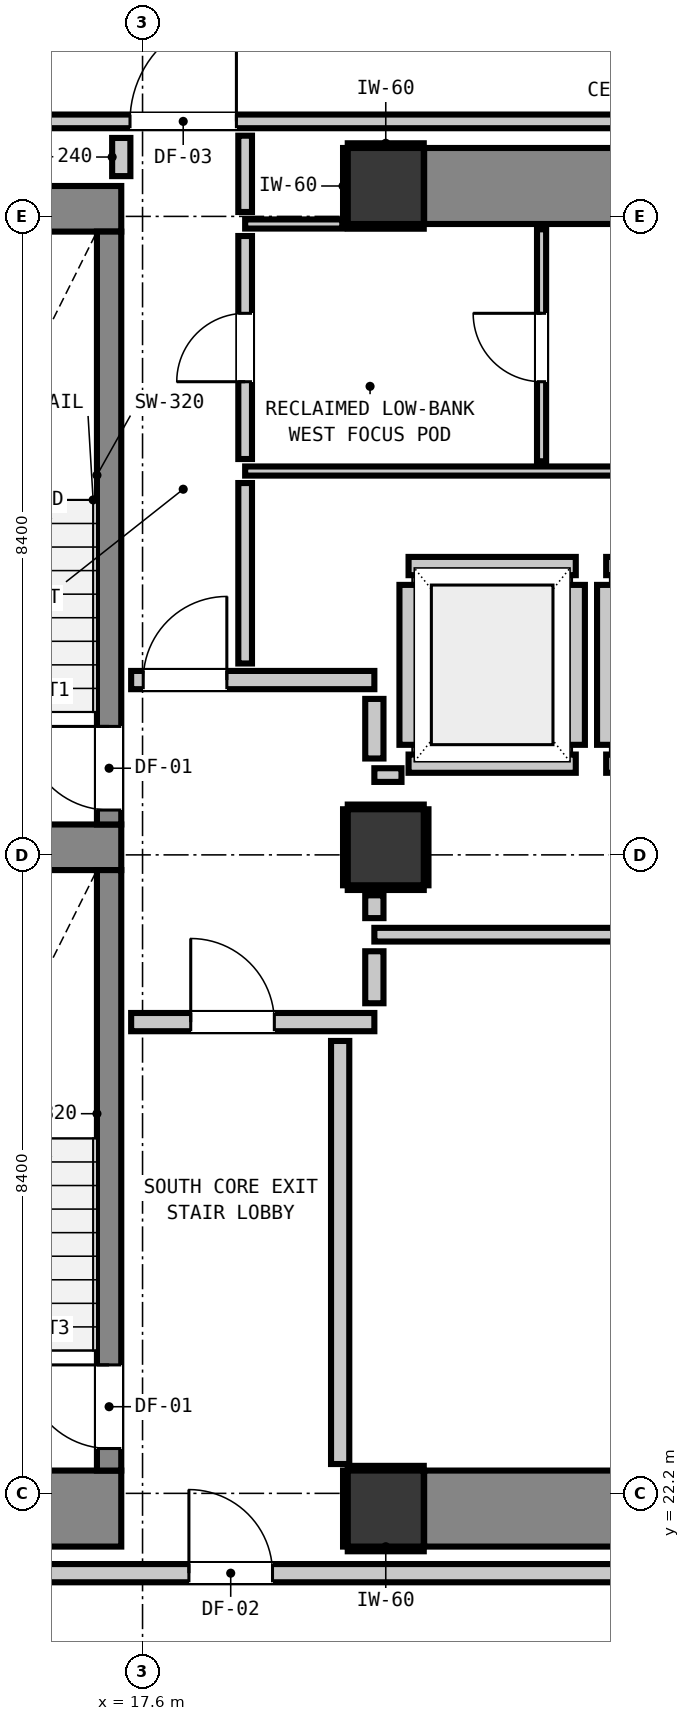
"""IFC4 building model, lengths in metres.
Left out: names, types, materials, properties, quantities, classifications, styles, units other than length and angle.
Written with IfcOpenShell. Run it as: python <this file> out.ifc"""

import sys

from ifc_helpers import new_model, si_unit, direction, frame, frame_2d, origin, origin_2d, place, context, subcontext, project, spatial, rectangle, extrude, element, fill, save


model = new_model("IFC4")
c1 = context("Model", 3, precision=1e-05, world=origin(), true_north=direction((0.0, 1.0)))
c2 = subcontext(c1, "Body", "Model", "MODEL_VIEW")
j1 = project(units=[si_unit("LENGTHUNIT", "METRE"), si_unit("PLANEANGLEUNIT", "RADIAN")], contexts=[c1])
p1 = place(None, origin())
s1 = spatial("IfcSite", under=j1, at=p1, CompositionType="ELEMENT")
p2 = place(p1, origin())
s2 = spatial("IfcBuilding", under=s1, at=p2, CompositionType="ELEMENT")
p3 = place(p2, frame((0.0, 0.0, 139.28)))
s3 = spatial("IfcBuildingStorey", under=s2, at=p3, CompositionType="ELEMENT", Elevation=139.28)
for number, where, z_axis, x_axis in (
    (1, (20.8, 22.0, 0.0), (0.0, 0.0, 1.0), (1.0, 0.0, 0.0)),
    (2, (20.8, 39.4, 0.0), (0.0, 0.0, 1.0), (1.0, 0.0, 0.0)),
):
    element("IfcColumn", number, at=place(p3, frame(where, z_axis=z_axis, x_axis=x_axis)), inside=s3, PredefinedType="COLUMN", context=c2, shape_type="SweptSolid", body=[
        extrude(rectangle(XDim=1.0, YDim=1.0, at=origin_2d()), origin(), (0.0, 0.0, 1.0), 3.32),
    ])
p4 = place(p3, frame((13.24, 22.0, 0.0), z_axis=(0.0, 0.0, 1.0), x_axis=(1.0, 0.0, 0.0)))
e3 = element("IfcWall", 3, at=p4, inside=s3, PredefinedType="SHEAR", context=c2, shape_type="SweptSolid", body=[
    extrude(rectangle(XDim=4.08, YDim=1.0, at=frame_2d((2.04, 0.0))), origin(), (0.0, 0.0, 1.0), 3.32),
])
p5 = place(p3, frame((13.24, 39.1, 0.0), z_axis=(0.0, 0.0, 1.0), x_axis=(1.0, 0.0, 0.0)))
e4 = element("IfcWall", 4, at=p5, inside=s3, PredefinedType="SHEAR", context=c2, shape_type="SweptSolid", body=[
    extrude(rectangle(XDim=4.08, YDim=0.6, at=frame_2d((2.04, 0.0))), origin(), (0.0, 0.0, 1.0), 3.32),
])
p6 = place(p3, frame((13.905, 30.7, 0.0), z_axis=(0.0, 0.0, 1.0), x_axis=(1.0, 0.0, 0.0)))
e5 = element("IfcWall", 5, at=p6, inside=s3, PredefinedType="SHEAR", context=c2, shape_type="SweptSolid", body=[
    extrude(rectangle(XDim=3.415, YDim=0.6, at=frame_2d((1.708, 0.0))), origin(), (0.0, 0.0, 1.0), 3.32),
])
for number, where, z_axis, x_axis in (
    (6, (21.305, 22.0, 0.0), (0.0, 0.0, 1.0), (1.0, 0.0, 0.0)),
    (7, (21.305, 39.4, 0.0), (0.0, 0.0, 1.0), (1.0, 0.0, 0.0)),
):
    element("IfcWall", number, at=place(p3, frame(where, z_axis=z_axis, x_axis=x_axis)), inside=s3, PredefinedType="SHEAR", context=c2, shape_type="SweptSolid", body=[
        extrude(rectangle(XDim=7.39, YDim=1.0, at=frame_2d((3.695, 0.0))), origin(), (0.0, 0.0, 1.0), 3.32),
    ])
p7 = place(p3, frame((17.16, 31.0, 0.0), z_axis=(0.0, 0.0, 1.0), x_axis=(0.0, 1.0, 0.0)))
e8 = element("IfcWall", 8, at=p7, inside=s3, PredefinedType="SHEAR", context=c2, shape_type="SweptSolid", body=[
    extrude(rectangle(XDim=7.8, YDim=0.32, at=frame_2d((3.9, 0.0))), origin(), (0.0, 0.0, 1.0), 3.32),
])
p8 = place(p7, frame((0.19, 0.0, 0.0)))
e9 = element("IfcOpeningElement", 9, at=p8, cuts=e8, PredefinedType="OPENING", context=c2, shape_type="SweptSolid", body=[
    extrude(rectangle(XDim=1.1, YDim=2.15, at=frame_2d((0.55, 1.075))), frame((0.0, 0.17, 0.0), z_axis=(0.0, -1.0, 0.0), x_axis=(1.0, 0.0, 0.0)), (0.0, 0.0, 1.0), 0.34),
])
p9 = place(p3, frame((17.16, 22.5, 0.0), z_axis=(0.0, 0.0, 1.0), x_axis=(0.0, 1.0, 0.0)))
e10 = element("IfcWall", 10, at=p9, inside=s3, PredefinedType="SHEAR", context=c2, shape_type="SweptSolid", body=[
    extrude(rectangle(XDim=7.9, YDim=0.32, at=frame_2d((3.95, 0.0))), origin(), (0.0, 0.0, 1.0), 3.32),
])
p10 = place(p9, frame((0.29, 0.0, 0.0)))
e11 = element("IfcOpeningElement", 11, at=p10, cuts=e10, PredefinedType="OPENING", context=c2, shape_type="SweptSolid", body=[
    extrude(rectangle(XDim=1.1, YDim=2.15, at=frame_2d((0.55, 1.075))), frame((0.0, 0.17, 0.0), z_axis=(0.0, -1.0, 0.0), x_axis=(1.0, 0.0, 0.0)), (0.0, 0.0, 1.0), 0.34),
])
p11 = place(p3, frame((20.8, 30.7, 0.0), z_axis=(0.0, 0.0, 1.0), x_axis=(1.0, 0.0, 0.0)))
e12 = element("IfcColumn", 12, at=p11, inside=s3, PredefinedType="COLUMN", context=c2, shape_type="SweptSolid", body=[
    extrude(rectangle(XDim=1.0, YDim=1.0, at=origin_2d()), origin(), (0.0, 0.0, 1.0), 3.32),
])
for number, where, z_axis, x_axis in (
    (13, (21.1, 31.8, 0.0), (0.0, 0.0, 1.0), (1.0, 0.0, 0.0)),
    (14, (21.1, 34.4, 0.0), (0.0, 0.0, 1.0), (1.0, 0.0, 0.0)),
):
    element("IfcWall", number, at=place(p3, frame(where, z_axis=z_axis, x_axis=x_axis)), inside=s3, PredefinedType="PARTITIONING", context=c2, shape_type="SweptSolid", body=[
        extrude(rectangle(XDim=2.2, YDim=0.24, at=frame_2d((1.1, 0.0))), origin(), (0.0, 0.0, 1.0), 3.08),
    ])
p12 = place(p3, frame((21.1, 32.048, 0.0), z_axis=(0.0, 0.0, 1.0), x_axis=(0.0, 1.0, 0.0)))
e15 = element("IfcWall", 15, at=p12, inside=s3, PredefinedType="PARTITIONING", context=c2, shape_type="SweptSolid", body=[
    extrude(rectangle(XDim=2.104, YDim=0.24, at=frame_2d((1.052, 0.0))), origin(), (0.0, 0.0, 1.0), 2.315),
])
p13 = place(p3, frame((23.3, 32.048, 0.0), z_axis=(0.0, 0.0, 1.0), x_axis=(0.0, 1.0, 0.0)))
e16 = element("IfcWall", 16, at=p13, inside=s3, PredefinedType="PARTITIONING", context=c2, shape_type="SweptSolid", body=[
    extrude(rectangle(XDim=2.104, YDim=0.24, at=frame_2d((1.052, 0.0))), origin(), (0.0, 0.0, 1.0), 3.08),
])
for number, where, z_axis, x_axis in (
    (17, (23.7, 31.8, 0.0), (0.0, 0.0, 1.0), (1.0, 0.0, 0.0)),
    (18, (23.7, 34.4, 0.0), (0.0, 0.0, 1.0), (1.0, 0.0, 0.0)),
):
    element("IfcWall", number, at=place(p3, frame(where, z_axis=z_axis, x_axis=x_axis)), inside=s3, PredefinedType="PARTITIONING", context=c2, shape_type="SweptSolid", body=[
        extrude(rectangle(XDim=2.2, YDim=0.24, at=frame_2d((1.1, 0.0))), origin(), (0.0, 0.0, 1.0), 3.08),
    ])
p14 = place(p3, frame((23.7, 32.048, 0.0), z_axis=(0.0, 0.0, 1.0), x_axis=(0.0, 1.0, 0.0)))
e19 = element("IfcWall", 19, at=p14, inside=s3, PredefinedType="PARTITIONING", context=c2, shape_type="SweptSolid", body=[
    extrude(rectangle(XDim=2.104, YDim=0.24, at=frame_2d((1.052, 0.0))), origin(), (0.0, 0.0, 1.0), 3.08),
])
p15 = place(p3, frame((9.407, 21.15, 0.0), z_axis=(0.0, 0.0, 1.0), x_axis=(1.0, 0.0, 0.0)))
e20 = element("IfcWall", 20, at=p15, inside=s3, PredefinedType="PARTITIONING", context=c2, shape_type="SweptSolid", body=[
    extrude(rectangle(XDim=39.386, YDim=0.24, at=frame_2d((19.693, 0.0))), origin(), (0.0, 0.0, 1.0), 3.08),
])
p16 = place(p15, frame((8.803, 0.0, 0.0)))
e21 = element("IfcOpeningElement", 21, at=p16, cuts=e20, PredefinedType="OPENING", context=c2, shape_type="SweptSolid", body=[
    extrude(rectangle(XDim=1.1, YDim=2.15, at=frame_2d((0.55, 1.075))), frame((0.0, 0.13, 0.0), z_axis=(0.0, -1.0, 0.0), x_axis=(1.0, 0.0, 0.0)), (0.0, 0.0, 1.0), 0.26),
])
p17 = place(p15, frame((1.192, 0.0, 0.0)))
e22 = element("IfcOpeningElement", 22, at=p17, cuts=e20, PredefinedType="OPENING", context=c2, shape_type="SweptSolid", body=[
    extrude(rectangle(XDim=1.4, YDim=2.15, at=frame_2d((0.7, 1.075))), frame((0.0, 0.13, 0.0), z_axis=(0.0, -1.0, 0.0), x_axis=(1.0, 0.0, 0.0)), (0.0, 0.0, 1.0), 0.26),
])
p18 = place(p15, frame((28.643, 0.0, 0.0)))
e23 = element("IfcOpeningElement", 23, at=p18, cuts=e20, PredefinedType="OPENING", context=c2, shape_type="SweptSolid", body=[
    extrude(rectangle(XDim=1.4, YDim=2.15, at=frame_2d((0.7, 1.075))), frame((0.0, 0.13, 0.0), z_axis=(0.0, -1.0, 0.0), x_axis=(1.0, 0.0, 0.0)), (0.0, 0.0, 1.0), 0.26),
])
p19 = place(p3, frame((17.45, 28.4, 0.0), z_axis=(0.0, 0.0, 1.0), x_axis=(1.0, 0.0, 0.0)))
e24 = element("IfcWall", 24, at=p19, inside=s3, PredefinedType="PARTITIONING", context=c2, shape_type="SweptSolid", body=[
    extrude(rectangle(XDim=3.2, YDim=0.24, at=frame_2d((1.6, 0.0))), origin(), (0.0, 0.0, 1.0), 3.08),
])
p20 = place(p19, frame((0.784, 0.0, 0.0)))
e25 = element("IfcOpeningElement", 25, at=p20, cuts=e24, PredefinedType="OPENING", context=c2, shape_type="SweptSolid", body=[
    extrude(rectangle(XDim=1.1, YDim=2.15, at=frame_2d((0.55, 1.075))), frame((0.0, 0.13, 0.0), z_axis=(0.0, -1.0, 0.0), x_axis=(1.0, 0.0, 0.0)), (0.0, 0.0, 1.0), 0.26),
])
p21 = place(p3, frame((17.45, 32.9, 0.0), z_axis=(0.0, 0.0, 1.0), x_axis=(1.0, 0.0, 0.0)))
e26 = element("IfcWall", 26, at=p21, inside=s3, PredefinedType="PARTITIONING", context=c2, shape_type="SweptSolid", body=[
    extrude(rectangle(XDim=3.2, YDim=0.24, at=frame_2d((1.6, 0.0))), origin(), (0.0, 0.0, 1.0), 3.08),
])
p22 = place(p21, frame((0.159, 0.0, 0.0)))
e27 = element("IfcOpeningElement", 27, at=p22, cuts=e26, PredefinedType="OPENING", context=c2, shape_type="SweptSolid", body=[
    extrude(rectangle(XDim=1.1, YDim=2.15, at=frame_2d((0.55, 1.075))), frame((0.0, 0.13, 0.0), z_axis=(0.0, -1.0, 0.0), x_axis=(1.0, 0.0, 0.0)), (0.0, 0.0, 1.0), 0.26),
])
p23 = place(p3, frame((20.65, 29.55, 0.0), z_axis=(0.0, 0.0, 1.0), x_axis=(1.0, 0.0, 0.0)))
e28 = element("IfcWall", 28, at=p23, inside=s3, PredefinedType="PARTITIONING", context=c2, shape_type="SweptSolid", body=[
    extrude(rectangle(XDim=9.325, YDim=0.18, at=frame_2d((4.663, 0.0))), origin(), (0.0, 0.0, 1.0), 3.08),
])
p24 = place(p3, frame((20.65, 31.65, 0.0), z_axis=(0.0, 0.0, 1.0), x_axis=(1.0, 0.0, 0.0)))
e29 = element("IfcWall", 29, at=p24, inside=s3, PredefinedType="PARTITIONING", context=c2, shape_type="SweptSolid", body=[
    extrude(rectangle(XDim=0.357, YDim=0.18, at=frame_2d((0.179, 0.0))), origin(), (0.0, 0.0, 1.0), 3.08),
])
p25 = place(p3, frame((9.407, 40.25, 0.0), z_axis=(0.0, 0.0, 1.0), x_axis=(1.0, 0.0, 0.0)))
e30 = element("IfcWall", 30, at=p25, inside=s3, PredefinedType="PARTITIONING", context=c2, shape_type="SweptSolid", body=[
    extrude(rectangle(XDim=27.536, YDim=0.18, at=frame_2d((13.768, 0.0))), origin(), (0.0, 0.0, 1.0), 3.08),
])
p26 = place(p25, frame((8.028, 0.0, 0.0)))
e31 = element("IfcOpeningElement", 31, at=p26, cuts=e30, PredefinedType="OPENING", context=c2, shape_type="SweptSolid", body=[
    extrude(rectangle(XDim=1.4, YDim=2.15, at=frame_2d((0.7, 1.075))), frame((0.0, 0.1, 0.0), z_axis=(0.0, -1.0, 0.0), x_axis=(1.0, 0.0, 0.0)), (0.0, 0.0, 1.0), 0.2),
])
p27 = place(p25, frame((1.192, 0.0, 0.0)))
e32 = element("IfcOpeningElement", 32, at=p27, cuts=e30, PredefinedType="OPENING", context=c2, shape_type="SweptSolid", body=[
    extrude(rectangle(XDim=1.4, YDim=2.15, at=frame_2d((0.7, 1.075))), frame((0.0, 0.1, 0.0), z_axis=(0.0, -1.0, 0.0), x_axis=(1.0, 0.0, 0.0)), (0.0, 0.0, 1.0), 0.2),
])
p28 = place(p3, frame((18.95, 35.65, 0.0), z_axis=(0.0, 0.0, 1.0), x_axis=(1.0, 0.0, 0.0)))
e33 = element("IfcWall", 33, at=p28, inside=s3, PredefinedType="PARTITIONING", context=c2, shape_type="SweptSolid", body=[
    extrude(rectangle(XDim=11.025, YDim=0.12, at=frame_2d((5.513, 0.0))), origin(), (0.0, 0.0, 1.0), 3.08),
])
p29 = place(p3, frame((18.95, 38.9, 0.0), z_axis=(0.0, 0.0, 1.0), x_axis=(1.0, 0.0, 0.0)))
e34 = element("IfcWall", 34, at=p29, inside=s3, PredefinedType="PARTITIONING", context=c2, shape_type="SweptSolid", body=[
    extrude(rectangle(XDim=1.278, YDim=0.12, at=frame_2d((0.639, 0.0))), origin(), (0.0, 0.0, 1.0), 3.08),
])
p30 = place(p3, frame((17.32, 39.53, 0.0), z_axis=(0.0, 0.0, 1.0), x_axis=(0.0, 1.0, 0.0)))
e35 = element("IfcWall", 35, at=p30, inside=s3, PredefinedType="PARTITIONING", context=c2, shape_type="SweptSolid", body=[
    extrude(rectangle(XDim=0.502, YDim=0.24, at=frame_2d((0.251, 0.0))), origin(), (0.0, 0.0, 1.0), 3.08),
])
p31 = place(p3, frame((20.2, 22.586, 0.0), z_axis=(0.0, 0.0, 1.0), x_axis=(0.0, 1.0, 0.0)))
e36 = element("IfcWall", 36, at=p31, inside=s3, PredefinedType="PARTITIONING", context=c2, shape_type="SweptSolid", body=[
    extrude(rectangle(XDim=5.566, YDim=0.24, at=frame_2d((2.783, 0.0))), origin(), (0.0, 0.0, 1.0), 3.08),
])
p32 = place(p3, frame((20.65, 28.648, 0.0), z_axis=(0.0, 0.0, 1.0), x_axis=(0.0, 1.0, 0.0)))
e37 = element("IfcWall", 37, at=p32, inside=s3, PredefinedType="PARTITIONING", context=c2, shape_type="SweptSolid", body=[
    extrude(rectangle(XDim=0.684, YDim=0.24, at=frame_2d((0.342, 0.0))), origin(), (0.0, 0.0, 1.0), 2.315),
])
p33 = place(p3, frame((20.65, 29.768, 0.0), z_axis=(0.0, 0.0, 1.0), x_axis=(0.0, 1.0, 0.0)))
e38 = element("IfcWall", 38, at=p33, inside=s3, PredefinedType="PARTITIONING", context=c2, shape_type="SweptSolid", body=[
    extrude(rectangle(XDim=0.3, YDim=0.24, at=frame_2d((0.15, 0.0))), origin(), (0.0, 0.0, 1.0), 2.315),
])
p34 = place(p3, frame((20.65, 31.868, 0.0), z_axis=(0.0, 0.0, 1.0), x_axis=(0.0, 1.0, 0.0)))
e39 = element("IfcWall", 39, at=p34, inside=s3, PredefinedType="PARTITIONING", context=c2, shape_type="SweptSolid", body=[
    extrude(rectangle(XDim=0.784, YDim=0.24, at=frame_2d((0.392, 0.0))), origin(), (0.0, 0.0, 1.0), 2.315),
])
p35 = place(p3, frame((18.95, 33.118, 0.0), z_axis=(0.0, 0.0, 1.0), x_axis=(0.0, 1.0, 0.0)))
e40 = element("IfcWall", 40, at=p35, inside=s3, PredefinedType="PARTITIONING", context=c2, shape_type="SweptSolid", body=[
    extrude(rectangle(XDim=2.374, YDim=0.18, at=frame_2d((1.187, 0.0))), origin(), (0.0, 0.0, 1.0), 3.08),
])
p36 = place(p3, frame((18.95, 35.808, 0.0), z_axis=(0.0, 0.0, 1.0), x_axis=(0.0, 1.0, 0.0)))
e41 = element("IfcWall", 41, at=p36, inside=s3, PredefinedType="PARTITIONING", context=c2, shape_type="SweptSolid", body=[
    extrude(rectangle(XDim=2.934, YDim=0.18, at=frame_2d((1.467, 0.0))), origin(), (0.0, 0.0, 1.0), 3.08),
])
p37 = place(p36, frame((1.017, 0.0, 0.0)))
e42 = element("IfcOpeningElement", 42, at=p37, cuts=e41, PredefinedType="OPENING", context=c2, shape_type="SweptSolid", body=[
    extrude(rectangle(XDim=0.9, YDim=2.1, at=frame_2d((0.45, 1.05))), frame((0.0, 0.1, 0.0), z_axis=(0.0, -1.0, 0.0), x_axis=(1.0, 0.0, 0.0)), (0.0, 0.0, 1.0), 0.2),
])
p38 = place(p3, frame((18.95, 39.058, 0.0), z_axis=(0.0, 0.0, 1.0), x_axis=(0.0, 1.0, 0.0)))
e43 = element("IfcWall", 43, at=p38, inside=s3, PredefinedType="PARTITIONING", context=c2, shape_type="SweptSolid", body=[
    extrude(rectangle(XDim=1.004, YDim=0.18, at=frame_2d((0.502, 0.0))), origin(), (0.0, 0.0, 1.0), 3.08),
])
p39 = place(p3, frame((22.85, 35.778, 0.0), z_axis=(0.0, 0.0, 1.0), x_axis=(0.0, 1.0, 0.0)))
e44 = element("IfcWall", 44, at=p39, inside=s3, PredefinedType="PARTITIONING", context=c2, shape_type="SweptSolid", body=[
    extrude(rectangle(XDim=3.052, YDim=0.12, at=frame_2d((1.526, 0.0))), origin(), (0.0, 0.0, 1.0), 3.08),
])
p40 = place(p39, frame((1.047, 0.0, 0.0)))
e45 = element("IfcOpeningElement", 45, at=p40, cuts=e44, PredefinedType="OPENING", context=c2, shape_type="SweptSolid", body=[
    extrude(rectangle(XDim=0.9, YDim=2.1, at=frame_2d((0.45, 1.05))), frame((0.0, 0.07, 0.0), z_axis=(0.0, -1.0, 0.0), x_axis=(1.0, 0.0, 0.0)), (0.0, 0.0, 1.0), 0.14),
])
for number, where, z_axis, x_axis in (
    (46, (20.3, 21.468, 0.0), (0.0, 0.0, 1.0), (1.0, 0.0, 0.0)),
    (47, (20.3, 22.532, 0.0), (0.0, 0.0, 1.0), (1.0, 0.0, 0.0)),
    (48, (20.268, 21.5, 0.0), (0.0, 0.0, 1.0), (0.0, 1.0, 0.0)),
    (49, (20.3, 38.868, 0.0), (0.0, 0.0, 1.0), (1.0, 0.0, 0.0)),
    (50, (20.3, 39.932, 0.0), (0.0, 0.0, 1.0), (1.0, 0.0, 0.0)),
    (51, (20.268, 38.9, 0.0), (0.0, 0.0, 1.0), (0.0, 1.0, 0.0)),
    (52, (20.3, 30.168, 0.0), (0.0, 0.0, 1.0), (1.0, 0.0, 0.0)),
    (53, (20.3, 31.232, 0.0), (0.0, 0.0, 1.0), (1.0, 0.0, 0.0)),
    (54, (20.268, 30.2, 0.0), (0.0, 0.0, 1.0), (0.0, 1.0, 0.0)),
    (55, (21.332, 30.2, 0.0), (0.0, 0.0, 1.0), (0.0, 1.0, 0.0)),
):
    element("IfcWall", number, at=place(p3, frame(where, z_axis=z_axis, x_axis=x_axis)), inside=s3, PredefinedType="PARTITIONING", context=c2, shape_type="SweptSolid", body=[
        extrude(rectangle(XDim=1.0, YDim=0.06, at=frame_2d((0.5, 0.0))), origin(), (0.0, 0.0, 1.0), 1.45),
    ])
p41 = place(p8, origin())
e56 = element("IfcDoor", 56, at=p41, inside=s3, OperationType="SINGLE_SWING_RIGHT", PredefinedType="DOOR", context=c2, shape_type="SweptSolid", body=[
    extrude(rectangle(XDim=1.1, YDim=2.15, at=frame_2d((0.55, 1.075))), frame((0.0, 0.025, 0.0), z_axis=(0.0, -1.0, 0.0), x_axis=(1.0, 0.0, 0.0)), (0.0, 0.0, 1.0), 0.05),
])
fill(e9, e56)
p42 = place(p10, origin())
e57 = element("IfcDoor", 57, at=p42, inside=s3, OperationType="SINGLE_SWING_RIGHT", PredefinedType="DOOR", context=c2, shape_type="SweptSolid", body=[
    extrude(rectangle(XDim=1.1, YDim=2.15, at=frame_2d((0.55, 1.075))), frame((0.0, 0.025, 0.0), z_axis=(0.0, -1.0, 0.0), x_axis=(1.0, 0.0, 0.0)), (0.0, 0.0, 1.0), 0.05),
])
fill(e11, e57)
p43 = place(p20, origin())
e58 = element("IfcDoor", 58, at=p43, inside=s3, OperationType="SINGLE_SWING_LEFT", PredefinedType="DOOR", context=c2, shape_type="SweptSolid", body=[
    extrude(rectangle(XDim=1.1, YDim=2.15, at=frame_2d((0.55, 1.075))), frame((0.0, 0.025, 0.0), z_axis=(0.0, -1.0, 0.0), x_axis=(1.0, 0.0, 0.0)), (0.0, 0.0, 1.0), 0.05),
])
fill(e25, e58)
p44 = place(p22, origin())
e59 = element("IfcDoor", 59, at=p44, inside=s3, OperationType="SINGLE_SWING_RIGHT", PredefinedType="DOOR", context=c2, shape_type="SweptSolid", body=[
    extrude(rectangle(XDim=1.1, YDim=2.15, at=frame_2d((0.55, 1.075))), frame((0.0, 0.025, 0.0), z_axis=(0.0, -1.0, 0.0), x_axis=(1.0, 0.0, 0.0)), (0.0, 0.0, 1.0), 0.05),
])
fill(e27, e59)
p45 = place(p16, origin())
e60 = element("IfcDoor", 60, at=p45, inside=s3, OperationType="SINGLE_SWING_LEFT", PredefinedType="DOOR", context=c2, shape_type="SweptSolid", body=[
    extrude(rectangle(XDim=1.1, YDim=2.15, at=frame_2d((0.55, 1.075))), frame((0.0, 0.025, 0.0), z_axis=(0.0, -1.0, 0.0), x_axis=(1.0, 0.0, 0.0)), (0.0, 0.0, 1.0), 0.05),
])
fill(e21, e60)
p46 = place(p26, origin())
e61 = element("IfcDoor", 61, at=p46, inside=s3, OperationType="SINGLE_SWING_RIGHT", PredefinedType="DOOR", context=c2, shape_type="SweptSolid", body=[
    extrude(rectangle(XDim=1.4, YDim=2.15, at=frame_2d((0.7, 1.075))), frame((0.0, 0.025, 0.0), z_axis=(0.0, -1.0, 0.0), x_axis=(1.0, 0.0, 0.0)), (0.0, 0.0, 1.0), 0.05),
])
fill(e31, e61)
p47 = place(p37, origin())
e62 = element("IfcDoor", 62, at=p47, inside=s3, OperationType="SINGLE_SWING_LEFT", PredefinedType="DOOR", context=c2, shape_type="SweptSolid", body=[
    extrude(rectangle(XDim=0.9, YDim=2.1, at=frame_2d((0.45, 1.05))), frame((0.0, 0.025, 0.0), z_axis=(0.0, -1.0, 0.0), x_axis=(1.0, 0.0, 0.0)), (0.0, 0.0, 1.0), 0.05),
])
fill(e42, e62)
p48 = place(p40, origin())
e63 = element("IfcDoor", 63, at=p48, inside=s3, OperationType="SINGLE_SWING_RIGHT", PredefinedType="DOOR", context=c2, shape_type="SweptSolid", body=[
    extrude(rectangle(XDim=0.9, YDim=2.1, at=frame_2d((0.45, 1.05))), frame((0.0, 0.025, 0.0), z_axis=(0.0, -1.0, 0.0), x_axis=(1.0, 0.0, 0.0)), (0.0, 0.0, 1.0), 0.05),
])
fill(e45, e63)
save(model, sys.argv[1])
